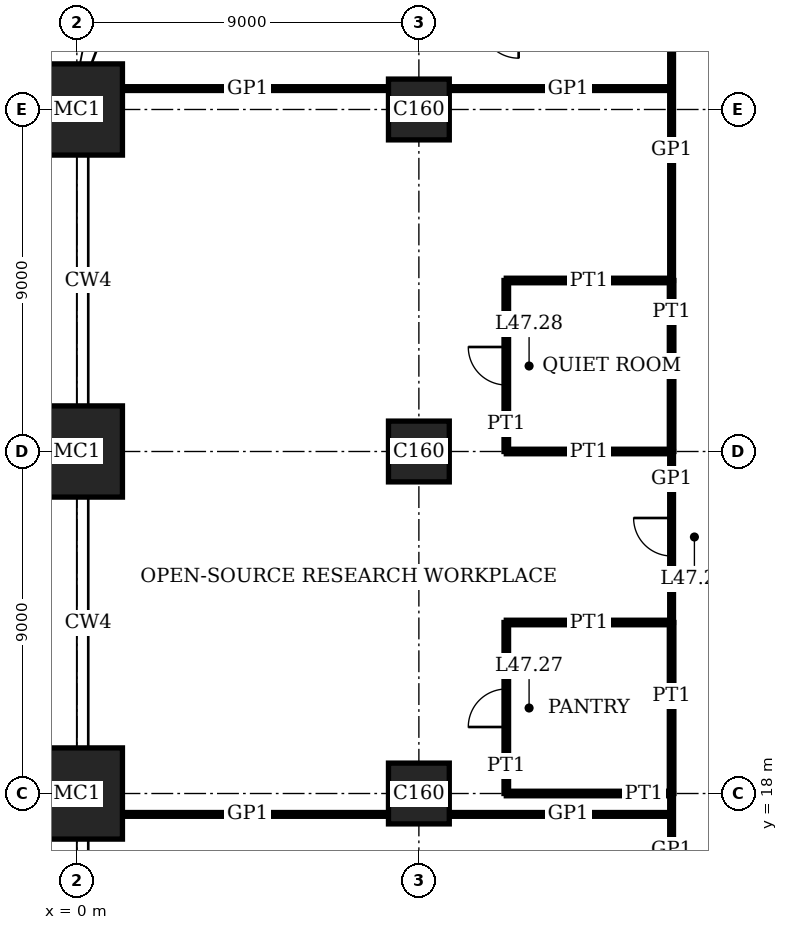
"""IFC4 building model, lengths in metres.
Left out: names, types, materials, properties, quantities, classifications, styles, units other than length and angle.
Written with IfcOpenShell. Run it as: python <this file> out.ifc"""

import sys

from ifc_helpers import new_model, si_unit, direction, frame, frame_2d, origin, origin_2d, place, context, subcontext, project, spatial, rectangle, extrude, element, fill, save


model = new_model("IFC4")
c1 = context("Model", 3, precision=1e-05, world=origin(), true_north=direction((0.0, 1.0)))
c2 = subcontext(c1, "Body", "Model", "MODEL_VIEW")
j1 = project(units=[si_unit("LENGTHUNIT", "METRE"), si_unit("PLANEANGLEUNIT", "RADIAN")], contexts=[c1])
p1 = place(None, origin())
s1 = spatial("IfcSite", under=j1, at=p1, CompositionType="ELEMENT")
p2 = place(p1, origin())
s2 = spatial("IfcBuilding", under=s1, at=p2, CompositionType="ELEMENT")
p3 = place(p2, frame((0.0, 0.0, 194.2)))
s3 = spatial("IfcBuildingStorey", under=s2, at=p3, CompositionType="ELEMENT", Elevation=194.2)
for number, where, z_axis, x_axis in (
    (1, (0.0, 18.0, 0.0), (0.0, 0.0, 1.0), (1.0, 0.0, 0.0)),
    (2, (0.0, 27.0, 0.0), (0.0, 0.0, 1.0), (1.0, 0.0, 0.0)),
    (3, (0.0, 36.0, 0.0), (0.0, 0.0, 1.0), (1.0, 0.0, 0.0)),
):
    element("IfcColumn", number, at=place(p3, frame(where, z_axis=z_axis, x_axis=x_axis)), inside=s3, PredefinedType="COLUMN", context=c2, shape_type="SweptSolid", body=[
        extrude(rectangle(XDim=2.4, YDim=2.4, at=origin_2d()), origin(), (0.0, 0.0, 1.0), 4.0),
    ])
for number, where, z_axis, x_axis in (
    (4, (9.0, 18.0, 0.0), (0.0, 0.0, 1.0), (1.0, 0.0, 0.0)),
    (5, (9.0, 27.0, 0.0), (0.0, 0.0, 1.0), (1.0, 0.0, 0.0)),
    (6, (9.0, 36.0, 0.0), (0.0, 0.0, 1.0), (1.0, 0.0, 0.0)),
):
    element("IfcColumn", number, at=place(p3, frame(where, z_axis=z_axis, x_axis=x_axis)), inside=s3, PredefinedType="COLUMN", context=c2, shape_type="SweptSolid", body=[
        extrude(rectangle(XDim=1.6, YDim=1.6, at=origin_2d()), origin(), (0.0, 0.0, 1.0), 4.0),
    ])
p4 = place(p3, frame((1.2, 17.45, 0.0), z_axis=(0.0, 0.0, 1.0), x_axis=(1.0, 0.0, 0.0)))
e7 = element("IfcWall", 7, at=p4, inside=s3, PredefinedType="PARTITIONING", context=c2, shape_type="SweptSolid", body=[
    extrude(rectangle(XDim=7.0, YDim=0.1, at=frame_2d((3.5, 0.0))), origin(), (0.0, 0.0, 1.0), 3.75),
])
p5 = place(p3, frame((9.8, 17.45, 0.0), z_axis=(0.0, 0.0, 1.0), x_axis=(1.0, 0.0, 0.0)))
e8 = element("IfcWall", 8, at=p5, inside=s3, PredefinedType="PARTITIONING", context=c2, shape_type="SweptSolid", body=[
    extrude(rectangle(XDim=5.85, YDim=0.1, at=frame_2d((2.925, 0.0))), origin(), (0.0, 0.0, 1.0), 3.75),
])
p6 = place(p3, frame((11.3, 18.0, 0.0), z_axis=(0.0, 0.0, 1.0), x_axis=(1.0, 0.0, 0.0)))
e9 = element("IfcWall", 9, at=p6, inside=s3, PredefinedType="PARTITIONING", context=c2, shape_type="SweptSolid", body=[
    extrude(rectangle(XDim=4.35, YDim=0.12, at=frame_2d((2.175, 0.0))), origin(), (0.0, 0.0, 1.0), 3.05),
])
p7 = place(p3, frame((11.3, 22.5, 0.0), z_axis=(0.0, 0.0, 1.0), x_axis=(1.0, 0.0, 0.0)))
e10 = element("IfcWall", 10, at=p7, inside=s3, PredefinedType="PARTITIONING", context=c2, shape_type="SweptSolid", body=[
    extrude(rectangle(XDim=4.35, YDim=0.12, at=frame_2d((2.175, 0.0))), origin(), (0.0, 0.0, 1.0), 3.1),
])
p8 = place(p3, frame((11.3, 27.0, 0.0), z_axis=(0.0, 0.0, 1.0), x_axis=(1.0, 0.0, 0.0)))
e11 = element("IfcWall", 11, at=p8, inside=s3, PredefinedType="PARTITIONING", context=c2, shape_type="SweptSolid", body=[
    extrude(rectangle(XDim=4.35, YDim=0.12, at=frame_2d((2.175, 0.0))), origin(), (0.0, 0.0, 1.0), 3.05),
])
p9 = place(p3, frame((11.3, 31.5, 0.0), z_axis=(0.0, 0.0, 1.0), x_axis=(1.0, 0.0, 0.0)))
e12 = element("IfcWall", 12, at=p9, inside=s3, PredefinedType="PARTITIONING", context=c2, shape_type="SweptSolid", body=[
    extrude(rectangle(XDim=4.35, YDim=0.12, at=frame_2d((2.175, 0.0))), origin(), (0.0, 0.0, 1.0), 3.1),
])
p10 = place(p3, frame((1.2, 36.55, 0.0), z_axis=(0.0, 0.0, 1.0), x_axis=(1.0, 0.0, 0.0)))
e13 = element("IfcWall", 13, at=p10, inside=s3, PredefinedType="PARTITIONING", context=c2, shape_type="SweptSolid", body=[
    extrude(rectangle(XDim=7.0, YDim=0.1, at=frame_2d((3.5, 0.0))), origin(), (0.0, 0.0, 1.0), 3.75),
])
p11 = place(p3, frame((9.8, 36.55, 0.0), z_axis=(0.0, 0.0, 1.0), x_axis=(1.0, 0.0, 0.0)))
e14 = element("IfcWall", 14, at=p11, inside=s3, PredefinedType="PARTITIONING", context=c2, shape_type="SweptSolid", body=[
    extrude(rectangle(XDim=5.85, YDim=0.1, at=frame_2d((2.925, 0.0))), origin(), (0.0, 0.0, 1.0), 3.75),
])
p12 = place(p3, frame((11.3, 18.0, 0.0), z_axis=(0.0, 0.0, 1.0), x_axis=(0.0, 1.0, 0.0)))
e15 = element("IfcWall", 15, at=p12, inside=s3, PredefinedType="PARTITIONING", context=c2, shape_type="SweptSolid", body=[
    extrude(rectangle(XDim=4.5, YDim=0.12, at=frame_2d((2.25, 0.0))), origin(), (0.0, 0.0, 1.0), 3.75),
])
p13 = place(p12, frame((1.75, 0.0, 0.0)))
e16 = element("IfcOpeningElement", 16, at=p13, cuts=e15, PredefinedType="OPENING", context=c2, shape_type="SweptSolid", body=[
    extrude(rectangle(XDim=1.0, YDim=2.4, at=frame_2d((0.5, 1.2))), frame((0.0, 0.07, 0.0), z_axis=(0.0, -1.0, 0.0), x_axis=(1.0, 0.0, 0.0)), (0.0, 0.0, 1.0), 0.14),
])
p14 = place(p3, frame((11.3, 27.0, 0.0), z_axis=(0.0, 0.0, 1.0), x_axis=(0.0, 1.0, 0.0)))
e17 = element("IfcWall", 17, at=p14, inside=s3, PredefinedType="PARTITIONING", context=c2, shape_type="SweptSolid", body=[
    extrude(rectangle(XDim=4.5, YDim=0.12, at=frame_2d((2.25, 0.0))), origin(), (0.0, 0.0, 1.0), 3.75),
])
p15 = place(p14, frame((1.75, 0.0, 0.0)))
e18 = element("IfcOpeningElement", 18, at=p15, cuts=e17, PredefinedType="OPENING", context=c2, shape_type="SweptSolid", body=[
    extrude(rectangle(XDim=1.0, YDim=2.4, at=frame_2d((0.5, 1.2))), frame((0.0, 0.07, 0.0), z_axis=(0.0, -1.0, 0.0), x_axis=(1.0, 0.0, 0.0)), (0.0, 0.0, 1.0), 0.14),
])
for number, where, z_axis, x_axis in (
    (19, (15.65, 18.0, 0.0), (0.0, 0.0, 1.0), (0.0, 1.0, 0.0)),
    (20, (15.65, 27.0, 0.0), (0.0, 0.0, 1.0), (0.0, 1.0, 0.0)),
):
    element("IfcWall", number, at=place(p3, frame(where, z_axis=z_axis, x_axis=x_axis)), inside=s3, PredefinedType="PARTITIONING", context=c2, shape_type="SweptSolid", body=[
        extrude(rectangle(XDim=4.5, YDim=0.12, at=frame_2d((2.25, 0.0))), origin(), (0.0, 0.0, 1.0), 3.75),
    ])
p16 = place(p3, frame((15.65, 15.65, 0.0), z_axis=(0.0, 0.0, 1.0), x_axis=(0.0, 1.0, 0.0)))
e21 = element("IfcWall", 21, at=p16, inside=s3, PredefinedType="PARTITIONING", context=c2, shape_type="SweptSolid", body=[
    extrude(rectangle(XDim=2.35, YDim=0.1, at=frame_2d((1.175, 0.0))), origin(), (0.0, 0.0, 1.0), 3.75),
])
p17 = place(p3, frame((15.65, 22.5, 0.0), z_axis=(0.0, 0.0, 1.0), x_axis=(0.0, 1.0, 0.0)))
e22 = element("IfcWall", 22, at=p17, inside=s3, PredefinedType="PARTITIONING", context=c2, shape_type="SweptSolid", body=[
    extrude(rectangle(XDim=4.5, YDim=0.1, at=frame_2d((2.25, 0.0))), origin(), (0.0, 0.0, 1.0), 3.75),
])
p18 = place(p17, frame((1.75, 0.0, 0.0)))
e23 = element("IfcOpeningElement", 23, at=p18, cuts=e22, PredefinedType="OPENING", context=c2, shape_type="SweptSolid", body=[
    extrude(rectangle(XDim=1.0, YDim=2.4, at=frame_2d((0.5, 1.2))), frame((0.0, 0.06, 0.0), z_axis=(0.0, -1.0, 0.0), x_axis=(1.0, 0.0, 0.0)), (0.0, 0.0, 1.0), 0.12),
])
p19 = place(p3, frame((15.65, 31.5, 0.0), z_axis=(0.0, 0.0, 1.0), x_axis=(0.0, 1.0, 0.0)))
e24 = element("IfcWall", 24, at=p19, inside=s3, PredefinedType="PARTITIONING", context=c2, shape_type="SweptSolid", body=[
    extrude(rectangle(XDim=6.85, YDim=0.1, at=frame_2d((3.425, 0.0))), origin(), (0.0, 0.0, 1.0), 3.75),
])
p20 = place(p13, origin())
e25 = element("IfcDoor", 25, at=p20, inside=s3, OperationType="SINGLE_SWING_RIGHT", PredefinedType="DOOR", context=c2, shape_type="SweptSolid", body=[
    extrude(rectangle(XDim=1.0, YDim=2.4, at=frame_2d((0.5, 1.2))), frame((0.0, 0.025, 0.0), z_axis=(0.0, -1.0, 0.0), x_axis=(1.0, 0.0, 0.0)), (0.0, 0.0, 1.0), 0.05),
])
fill(e16, e25)
p21 = place(p15, origin())
e26 = element("IfcDoor", 26, at=p21, inside=s3, OperationType="SINGLE_SWING_LEFT", PredefinedType="DOOR", context=c2, shape_type="SweptSolid", body=[
    extrude(rectangle(XDim=1.0, YDim=2.4, at=frame_2d((0.5, 1.2))), frame((0.0, 0.025, 0.0), z_axis=(0.0, -1.0, 0.0), x_axis=(1.0, 0.0, 0.0)), (0.0, 0.0, 1.0), 0.05),
])
fill(e18, e26)
p22 = place(p18, origin())
e27 = element("IfcDoor", 27, at=p22, inside=s3, OperationType="SINGLE_SWING_LEFT", PredefinedType="DOOR", context=c2, shape_type="SweptSolid", body=[
    extrude(rectangle(XDim=1.0, YDim=2.4, at=frame_2d((0.5, 1.2))), frame((0.0, 0.02, 0.0), z_axis=(0.0, -1.0, 0.0), x_axis=(1.0, 0.0, 0.0)), (0.0, 0.0, 1.0), 0.04),
])
fill(e23, e27)
save(model, sys.argv[1])
